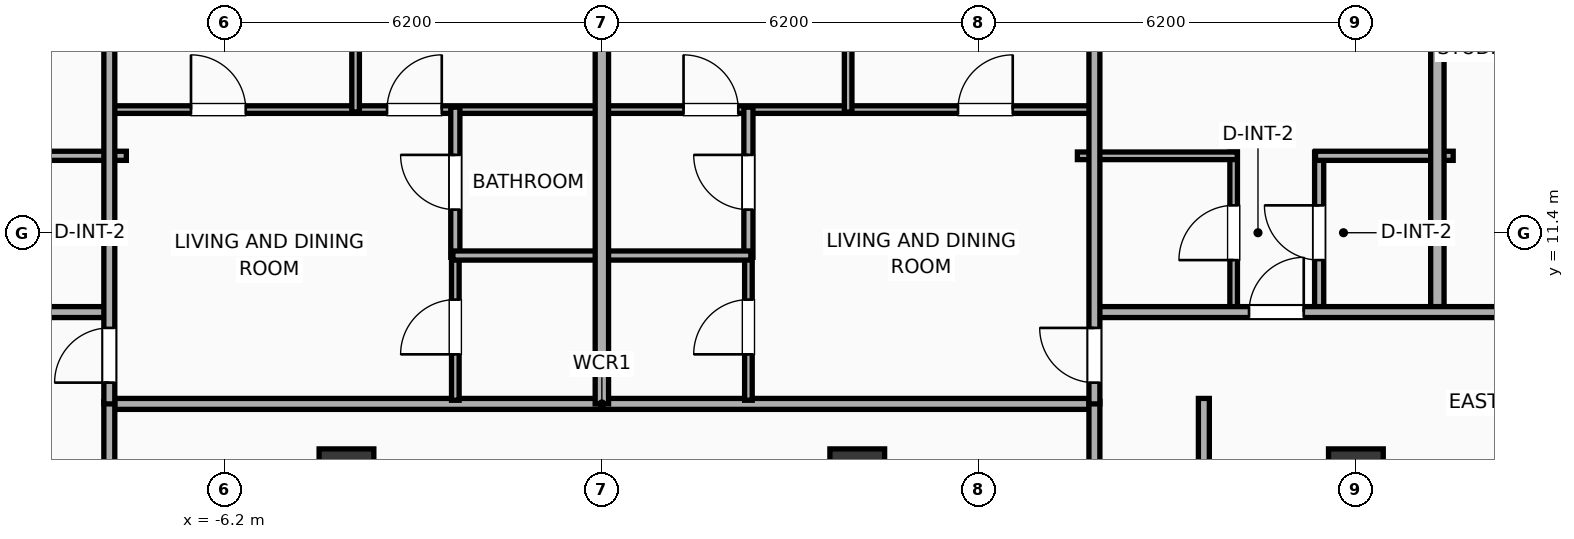
"""IFC4 building model, lengths in metres.
Left out: names, types, materials, properties, quantities, classifications, styles, units other than length and angle.
Written with IfcOpenShell. Run it as: python <this file> out.ifc"""

import sys

from ifc_helpers import new_model, si_unit, direction, frame, frame_2d, origin, origin_2d, place, context, subcontext, project, spatial, rectangle, extrude, element, fill, save


model = new_model("IFC4")
c1 = context("Model", 3, precision=1e-05, world=origin(), true_north=direction((0.0, 1.0)))
c2 = subcontext(c1, "Body", "Model", "MODEL_VIEW")
j1 = project(units=[si_unit("LENGTHUNIT", "METRE"), si_unit("PLANEANGLEUNIT", "RADIAN")], contexts=[c1])
p1 = place(None, origin())
s1 = spatial("IfcSite", under=j1, at=p1, CompositionType="ELEMENT")
p2 = place(p1, origin())
s2 = spatial("IfcBuilding", under=s1, at=p2, CompositionType="ELEMENT")
p3 = place(p2, frame((0.0, 0.0, 179.4)))
s3 = spatial("IfcBuildingStorey", under=s2, at=p3, CompositionType="ELEMENT", Elevation=179.4)
for number, where, z_axis, x_axis in (
    (1, (12.4, 7.4, 0.0), (0.0, 0.0, 1.0), (1.0, 0.0, 0.0)),
    (2, (-4.2, 7.4, 0.0), (0.0, 0.0, 1.0), (1.0, 0.0, 0.0)),
    (3, (4.2, 7.4, 0.0), (0.0, 0.0, 1.0), (1.0, 0.0, 0.0)),
):
    element("IfcColumn", number, at=place(p3, frame(where, z_axis=z_axis, x_axis=x_axis)), inside=s3, PredefinedType="COLUMN", context=c2, shape_type="SweptSolid", body=[
        extrude(rectangle(XDim=0.9, YDim=0.9, at=origin_2d()), origin(), (0.0, 0.0, 1.0), 3.9),
    ])
p4 = place(p3, frame((9.9, -8.68, 0.0), z_axis=(0.0, 0.0, 1.0), x_axis=(0.0, 1.0, 0.0)))
e4 = element("IfcWall", 4, at=p4, inside=s3, PredefinedType="PARTITIONING", context=c2, shape_type="SweptSolid", body=[
    extrude(rectangle(XDim=17.36, YDim=0.18, at=frame_2d((8.68, 0.0))), origin(), (0.0, 0.0, 1.0), 3.65),
])
p5 = place(p4, frame((7.262, 0.0, 0.0)))
e5 = element("IfcOpeningElement", 5, at=p5, cuts=e4, PredefinedType="OPENING", context=c2, shape_type="SweptSolid", body=[
    extrude(rectangle(XDim=1.1, YDim=2.05, at=frame_2d((0.55, 1.025))), frame((0.0, 0.1, 0.0), z_axis=(0.0, -1.0, 0.0), x_axis=(1.0, 0.0, 0.0)), (0.0, 0.0, 1.0), 0.2),
])
p6 = place(p3, frame((-8.15, 8.59, 0.0), z_axis=(0.0, 0.0, 1.0), x_axis=(1.0, 0.0, 0.0)))
e6 = element("IfcWall", 6, at=p6, inside=s3, PredefinedType="PARTITIONING", context=c2, shape_type="SweptSolid", body=[
    extrude(rectangle(XDim=16.3, YDim=0.18, at=frame_2d((8.15, 0.0))), origin(), (0.0, 0.0, 1.0), 3.65),
])
for number, where, z_axis, x_axis in (
    (7, (-8.1, 0.92, 0.0), (0.0, 0.0, 1.0), (0.0, 1.0, 0.0)),
    (8, (8.1, 0.92, 0.0), (0.0, 0.0, 1.0), (0.0, 1.0, 0.0)),
):
    element("IfcWall", number, at=place(p3, frame(where, z_axis=z_axis, x_axis=x_axis)), inside=s3, PredefinedType="PARTITIONING", context=c2, shape_type="SweptSolid", body=[
        extrude(rectangle(XDim=7.71, YDim=0.18, at=frame_2d((3.855, 0.0))), origin(), (0.0, 0.0, 1.0), 3.65),
    ])
p7 = place(p3, frame((-10.084, 12.67, 0.0), z_axis=(0.0, 0.0, 1.0), x_axis=(1.0, 0.0, 0.0)))
e9 = element("IfcWall", 9, at=p7, inside=s3, PredefinedType="PLUMBINGWALL", context=c2, shape_type="SweptSolid", body=[
    extrude(rectangle(XDim=2.264, YDim=0.15, at=frame_2d((1.132, 0.0))), origin(), (0.0, 0.0, 1.0), 3.65),
])
p8 = place(p3, frame((10.39, 10.08, 0.0), z_axis=(0.0, 0.0, 1.0), x_axis=(0.0, 1.0, 0.0)))
e10 = element("IfcWall", 10, at=p8, inside=s3, PredefinedType="PARTITIONING", context=c2, shape_type="SweptSolid", body=[
    extrude(rectangle(XDim=2.65, YDim=0.125, at=frame_2d((1.325, 0.0))), origin(), (0.0, 0.0, 1.0), 3.65),
])
p9 = place(p8, frame((0.875, 0.0, 0.0)))
e11 = element("IfcOpeningElement", 11, at=p9, cuts=e10, PredefinedType="OPENING", context=c2, shape_type="SweptSolid", body=[
    extrude(rectangle(XDim=0.9, YDim=2.05, at=frame_2d((0.45, 1.025))), frame((0.0, 0.073, 0.0), z_axis=(0.0, -1.0, 0.0), x_axis=(1.0, 0.0, 0.0)), (0.0, 0.0, 1.0), 0.145),
])
p10 = place(p3, frame((11.796, 10.08, 0.0), z_axis=(0.0, 0.0, 1.0), x_axis=(0.0, 1.0, 0.0)))
e12 = element("IfcWall", 12, at=p10, inside=s3, PredefinedType="PLUMBINGWALL", context=c2, shape_type="SweptSolid", body=[
    extrude(rectangle(XDim=2.65, YDim=0.15, at=frame_2d((1.325, 0.0))), origin(), (0.0, 0.0, 1.0), 3.04),
])
p11 = place(p10, frame((0.875, 0.0, 0.0)))
e13 = element("IfcOpeningElement", 13, at=p11, cuts=e12, PredefinedType="OPENING", context=c2, shape_type="SweptSolid", body=[
    extrude(rectangle(XDim=0.9, YDim=2.05, at=frame_2d((0.45, 1.025))), frame((0.0, 0.085, 0.0), z_axis=(0.0, -1.0, 0.0), x_axis=(1.0, 0.0, 0.0)), (0.0, 0.0, 1.0), 0.17),
])
p12 = place(p3, frame((7.82, 12.67, 0.0), z_axis=(0.0, 0.0, 1.0), x_axis=(1.0, 0.0, 0.0)))
e14 = element("IfcWall", 14, at=p12, inside=s3, PredefinedType="PARTITIONING", context=c2, shape_type="SweptSolid", body=[
    extrude(rectangle(XDim=2.63, YDim=0.125, at=frame_2d((1.315, 0.0))), origin(), (0.0, 0.0, 1.0), 3.65),
])
p13 = place(p3, frame((11.736, 12.67, 0.0), z_axis=(0.0, 0.0, 1.0), x_axis=(1.0, 0.0, 0.0)))
e15 = element("IfcWall", 15, at=p13, inside=s3, PredefinedType="PLUMBINGWALL", context=c2, shape_type="SweptSolid", body=[
    extrude(rectangle(XDim=2.264, YDim=0.15, at=frame_2d((1.132, 0.0))), origin(), (0.0, 0.0, 1.0), 3.65),
])
p14 = place(p3, frame((13.74, 10.02, 0.0), z_axis=(0.0, 0.0, 1.0), x_axis=(0.0, 1.0, 0.0)))
e16 = element("IfcWall", 16, at=p14, inside=s3, PredefinedType="PARTITIONING", context=c2, shape_type="SweptSolid", body=[
    extrude(rectangle(XDim=11.502, YDim=0.22, at=frame_2d((5.751, 0.0))), origin(), (0.0, 0.0, 1.0), 3.65),
])
p15 = place(p3, frame((-19.5, 10.1, 0.0), z_axis=(0.0, 0.0, 1.0), x_axis=(1.0, 0.0, 0.0)))
e17 = element("IfcWall", 17, at=p15, inside=s3, PredefinedType="PARTITIONING", context=c2, shape_type="SweptSolid", body=[
    extrude(rectangle(XDim=11.42, YDim=0.18, at=frame_2d((5.71, 0.0))), origin(), (0.0, 0.0, 1.0), 3.65),
])
p16 = place(p15, frame((3.464, 0.0, 0.0)))
e18 = element("IfcOpeningElement", 18, at=p16, cuts=e17, PredefinedType="OPENING", context=c2, shape_type="SweptSolid", body=[
    extrude(rectangle(XDim=1.15, YDim=2.05, at=frame_2d((0.575, 1.025))), frame((0.0, 0.1, 0.0), z_axis=(0.0, -1.0, 0.0), x_axis=(1.0, 0.0, 0.0)), (0.0, 0.0, 1.0), 0.2),
])
p17 = place(p15, frame((8.323, 0.0, 0.0)))
e19 = element("IfcOpeningElement", 19, at=p17, cuts=e17, PredefinedType="OPENING", context=c2, shape_type="SweptSolid", body=[
    extrude(rectangle(XDim=0.9, YDim=2.05, at=frame_2d((0.45, 1.025))), frame((0.0, 0.1, 0.0), z_axis=(0.0, -1.0, 0.0), x_axis=(1.0, 0.0, 0.0)), (0.0, 0.0, 1.0), 0.2),
])
p18 = place(p3, frame((8.08, 10.1, 0.0), z_axis=(0.0, 0.0, 1.0), x_axis=(1.0, 0.0, 0.0)))
e20 = element("IfcWall", 20, at=p18, inside=s3, PredefinedType="PARTITIONING", context=c2, shape_type="SweptSolid", body=[
    extrude(rectangle(XDim=11.42, YDim=0.18, at=frame_2d((5.71, 0.0))), origin(), (0.0, 0.0, 1.0), 3.65),
])
p19 = place(p18, frame((2.562, 0.0, 0.0)))
e21 = element("IfcOpeningElement", 21, at=p19, cuts=e20, PredefinedType="OPENING", context=c2, shape_type="SweptSolid", body=[
    extrude(rectangle(XDim=0.9, YDim=2.05, at=frame_2d((0.45, 1.025))), frame((0.0, 0.1, 0.0), z_axis=(0.0, -1.0, 0.0), x_axis=(1.0, 0.0, 0.0)), (0.0, 0.0, 1.0), 0.2),
])
p20 = place(p18, frame((6.853, 0.0, 0.0)))
e22 = element("IfcOpeningElement", 22, at=p20, cuts=e20, PredefinedType="OPENING", context=c2, shape_type="SweptSolid", body=[
    extrude(rectangle(XDim=1.15, YDim=2.05, at=frame_2d((0.575, 1.025))), frame((0.0, 0.1, 0.0), z_axis=(0.0, -1.0, 0.0), x_axis=(1.0, 0.0, 0.0)), (0.0, 0.0, 1.0), 0.2),
])
p21 = place(p3, frame((-8.08, 13.43, 0.0), z_axis=(0.0, 0.0, 1.0), x_axis=(1.0, 0.0, 0.0)))
e23 = element("IfcWall", 23, at=p21, inside=s3, PredefinedType="PARTITIONING", context=c2, shape_type="SweptSolid", body=[
    extrude(rectangle(XDim=8.06, YDim=0.125, at=frame_2d((4.03, 0.0))), origin(), (0.0, 0.0, 1.0), 3.65),
])
p22 = place(p21, frame((1.323, 0.0, 0.0)))
e24 = element("IfcOpeningElement", 24, at=p22, cuts=e23, PredefinedType="OPENING", context=c2, shape_type="SweptSolid", body=[
    extrude(rectangle(XDim=0.9, YDim=2.05, at=frame_2d((0.45, 1.025))), frame((0.0, 0.073, 0.0), z_axis=(0.0, -1.0, 0.0), x_axis=(1.0, 0.0, 0.0)), (0.0, 0.0, 1.0), 0.145),
])
p23 = place(p21, frame((4.547, 0.0, 0.0)))
e25 = element("IfcOpeningElement", 25, at=p23, cuts=e23, PredefinedType="OPENING", context=c2, shape_type="SweptSolid", body=[
    extrude(rectangle(XDim=0.9, YDim=2.05, at=frame_2d((0.45, 1.025))), frame((0.0, 0.073, 0.0), z_axis=(0.0, -1.0, 0.0), x_axis=(1.0, 0.0, 0.0)), (0.0, 0.0, 1.0), 0.145),
])
p24 = place(p3, frame((-2.41, 8.65, 0.0), z_axis=(0.0, 0.0, 1.0), x_axis=(0.0, 1.0, 0.0)))
e26 = element("IfcWall", 26, at=p24, inside=s3, PredefinedType="PARTITIONING", context=c2, shape_type="SweptSolid", body=[
    extrude(rectangle(XDim=2.41, YDim=0.125, at=frame_2d((1.205, 0.0))), origin(), (0.0, 0.0, 1.0), 3.65),
])
p25 = place(p24, frame((0.755, 0.0, 0.0)))
e27 = element("IfcOpeningElement", 27, at=p25, cuts=e26, PredefinedType="OPENING", context=c2, shape_type="SweptSolid", body=[
    extrude(rectangle(XDim=0.9, YDim=2.05, at=frame_2d((0.45, 1.025))), frame((0.0, 0.073, 0.0), z_axis=(0.0, -1.0, 0.0), x_axis=(1.0, 0.0, 0.0)), (0.0, 0.0, 1.0), 0.145),
])
p26 = place(p3, frame((-2.41, 11.0, 0.0), z_axis=(0.0, 0.0, 1.0), x_axis=(0.0, 1.0, 0.0)))
e28 = element("IfcWall", 28, at=p26, inside=s3, PredefinedType="PLUMBINGWALL", context=c2, shape_type="SweptSolid", body=[
    extrude(rectangle(XDim=2.47, YDim=0.15, at=frame_2d((1.235, 0.0))), origin(), (0.0, 0.0, 1.0), 3.04),
])
p27 = place(p26, frame((0.785, 0.0, 0.0)))
e29 = element("IfcOpeningElement", 29, at=p27, cuts=e28, PredefinedType="OPENING", context=c2, shape_type="SweptSolid", body=[
    extrude(rectangle(XDim=0.9, YDim=2.05, at=frame_2d((0.45, 1.025))), frame((0.0, 0.085, 0.0), z_axis=(0.0, -1.0, 0.0), x_axis=(1.0, 0.0, 0.0)), (0.0, 0.0, 1.0), 0.17),
])
p28 = place(p3, frame((-2.45, 11.03, 0.0), z_axis=(0.0, 0.0, 1.0), x_axis=(1.0, 0.0, 0.0)))
e30 = element("IfcWall", 30, at=p28, inside=s3, PredefinedType="PLUMBINGWALL", context=c2, shape_type="SweptSolid", body=[
    extrude(rectangle(XDim=2.43, YDim=0.15, at=frame_2d((1.215, 0.0))), origin(), (0.0, 0.0, 1.0), 3.65),
])
p29 = place(p3, frame((-4.05, 13.39, 0.0), z_axis=(0.0, 0.0, 1.0), x_axis=(0.0, 1.0, 0.0)))
e31 = element("IfcWall", 31, at=p29, inside=s3, PredefinedType="PARTITIONING", context=c2, shape_type="SweptSolid", body=[
    extrude(rectangle(XDim=6.262, YDim=0.125, at=frame_2d((3.131, 0.0))), origin(), (0.0, 0.0, 1.0), 3.65),
])
p30 = place(p3, frame((-8.1, 8.59, 0.0), z_axis=(0.0, 0.0, 1.0), x_axis=(0.0, 1.0, 0.0)))
e32 = element("IfcWall", 32, at=p30, inside=s3, PredefinedType="PARTITIONING", context=c2, shape_type="SweptSolid", body=[
    extrude(rectangle(XDim=10.636, YDim=0.18, at=frame_2d((5.318, 0.0))), origin(), (0.0, 0.0, 1.0), 3.65),
])
p31 = place(p30, frame((0.35, 0.0, 0.0)))
e33 = element("IfcOpeningElement", 33, at=p31, cuts=e32, PredefinedType="OPENING", context=c2, shape_type="SweptSolid", body=[
    extrude(rectangle(XDim=0.9, YDim=2.05, at=frame_2d((0.45, 1.025))), frame((0.0, 0.1, 0.0), z_axis=(0.0, -1.0, 0.0), x_axis=(1.0, 0.0, 0.0)), (0.0, 0.0, 1.0), 0.2),
])
p32 = place(p3, frame((0.02, 13.43, 0.0), z_axis=(0.0, 0.0, 1.0), x_axis=(1.0, 0.0, 0.0)))
e34 = element("IfcWall", 34, at=p32, inside=s3, PredefinedType="PARTITIONING", context=c2, shape_type="SweptSolid", body=[
    extrude(rectangle(XDim=8.06, YDim=0.125, at=frame_2d((4.03, 0.0))), origin(), (0.0, 0.0, 1.0), 3.65),
])
p33 = place(p32, frame((1.323, 0.0, 0.0)))
e35 = element("IfcOpeningElement", 35, at=p33, cuts=e34, PredefinedType="OPENING", context=c2, shape_type="SweptSolid", body=[
    extrude(rectangle(XDim=0.9, YDim=2.05, at=frame_2d((0.45, 1.025))), frame((0.0, 0.073, 0.0), z_axis=(0.0, -1.0, 0.0), x_axis=(1.0, 0.0, 0.0)), (0.0, 0.0, 1.0), 0.145),
])
p34 = place(p32, frame((5.837, 0.0, 0.0)))
e36 = element("IfcOpeningElement", 36, at=p34, cuts=e34, PredefinedType="OPENING", context=c2, shape_type="SweptSolid", body=[
    extrude(rectangle(XDim=0.9, YDim=2.05, at=frame_2d((0.45, 1.025))), frame((0.0, 0.073, 0.0), z_axis=(0.0, -1.0, 0.0), x_axis=(1.0, 0.0, 0.0)), (0.0, 0.0, 1.0), 0.145),
])
p35 = place(p3, frame((2.41, 8.65, 0.0), z_axis=(0.0, 0.0, 1.0), x_axis=(0.0, 1.0, 0.0)))
e37 = element("IfcWall", 37, at=p35, inside=s3, PredefinedType="PARTITIONING", context=c2, shape_type="SweptSolid", body=[
    extrude(rectangle(XDim=2.41, YDim=0.125, at=frame_2d((1.205, 0.0))), origin(), (0.0, 0.0, 1.0), 3.65),
])
p36 = place(p35, frame((0.755, 0.0, 0.0)))
e38 = element("IfcOpeningElement", 38, at=p36, cuts=e37, PredefinedType="OPENING", context=c2, shape_type="SweptSolid", body=[
    extrude(rectangle(XDim=0.9, YDim=2.05, at=frame_2d((0.45, 1.025))), frame((0.0, 0.073, 0.0), z_axis=(0.0, -1.0, 0.0), x_axis=(1.0, 0.0, 0.0)), (0.0, 0.0, 1.0), 0.145),
])
p37 = place(p3, frame((2.41, 11.0, 0.0), z_axis=(0.0, 0.0, 1.0), x_axis=(0.0, 1.0, 0.0)))
e39 = element("IfcWall", 39, at=p37, inside=s3, PredefinedType="PLUMBINGWALL", context=c2, shape_type="SweptSolid", body=[
    extrude(rectangle(XDim=2.47, YDim=0.15, at=frame_2d((1.235, 0.0))), origin(), (0.0, 0.0, 1.0), 3.65),
])
p38 = place(p37, frame((0.785, 0.0, 0.0)))
e40 = element("IfcOpeningElement", 40, at=p38, cuts=e39, PredefinedType="OPENING", context=c2, shape_type="SweptSolid", body=[
    extrude(rectangle(XDim=0.9, YDim=2.05, at=frame_2d((0.45, 1.025))), frame((0.0, 0.085, 0.0), z_axis=(0.0, -1.0, 0.0), x_axis=(1.0, 0.0, 0.0)), (0.0, 0.0, 1.0), 0.17),
])
p39 = place(p3, frame((0.02, 11.03, 0.0), z_axis=(0.0, 0.0, 1.0), x_axis=(1.0, 0.0, 0.0)))
e41 = element("IfcWall", 41, at=p39, inside=s3, PredefinedType="PLUMBINGWALL", context=c2, shape_type="SweptSolid", body=[
    extrude(rectangle(XDim=2.43, YDim=0.15, at=frame_2d((1.215, 0.0))), origin(), (0.0, 0.0, 1.0), 3.65),
])
p40 = place(p3, frame((4.05, 13.39, 0.0), z_axis=(0.0, 0.0, 1.0), x_axis=(0.0, 1.0, 0.0)))
e42 = element("IfcWall", 42, at=p40, inside=s3, PredefinedType="PARTITIONING", context=c2, shape_type="SweptSolid", body=[
    extrude(rectangle(XDim=7.114, YDim=0.125, at=frame_2d((3.557, 0.0))), origin(), (0.0, 0.0, 1.0), 3.65),
])
p41 = place(p3, frame((8.1, 8.59, 0.0), z_axis=(0.0, 0.0, 1.0), x_axis=(0.0, 1.0, 0.0)))
e43 = element("IfcWall", 43, at=p41, inside=s3, PredefinedType="PARTITIONING", context=c2, shape_type="SweptSolid", body=[
    extrude(rectangle(XDim=12.339, YDim=0.18, at=frame_2d((6.169, 0.0))), origin(), (0.0, 0.0, 1.0), 3.65),
])
p42 = place(p41, frame((0.35, 0.0, 0.0)))
e44 = element("IfcOpeningElement", 44, at=p42, cuts=e43, PredefinedType="OPENING", context=c2, shape_type="SweptSolid", body=[
    extrude(rectangle(XDim=0.9, YDim=2.05, at=frame_2d((0.45, 1.025))), frame((0.0, 0.1, 0.0), z_axis=(0.0, -1.0, 0.0), x_axis=(1.0, 0.0, 0.0)), (0.0, 0.0, 1.0), 0.2),
])
p43 = place(p3, frame((0.0, 8.59, 0.0), z_axis=(0.0, 0.0, 1.0), x_axis=(0.0, 1.0, 0.0)))
e45 = element("IfcWall", 45, at=p43, inside=s3, PredefinedType="PARTITIONING", context=c2, shape_type="SweptSolid", body=[
    extrude(rectangle(XDim=11.488, YDim=0.22, at=frame_2d((5.744, 0.0))), origin(), (0.0, 0.0, 1.0), 3.04),
])
p44 = place(p9, origin())
e46 = element("IfcDoor", 46, at=p44, inside=s3, OperationType="SINGLE_SWING_LEFT", PredefinedType="DOOR", context=c2, shape_type="SweptSolid", body=[
    extrude(rectangle(XDim=0.9, YDim=2.05, at=frame_2d((0.45, 1.025))), frame((0.0, 0.025, 0.0), z_axis=(0.0, -1.0, 0.0), x_axis=(1.0, 0.0, 0.0)), (0.0, 0.0, 1.0), 0.05),
])
fill(e11, e46)
p45 = place(p11, origin())
e47 = element("IfcDoor", 47, at=p45, inside=s3, OperationType="SINGLE_SWING_RIGHT", PredefinedType="DOOR", context=c2, shape_type="SweptSolid", body=[
    extrude(rectangle(XDim=0.9, YDim=2.05, at=frame_2d((0.45, 1.025))), frame((0.0, 0.025, 0.0), z_axis=(0.0, -1.0, 0.0), x_axis=(1.0, 0.0, 0.0)), (0.0, 0.0, 1.0), 0.05),
])
fill(e13, e47)
p46 = place(p19, origin())
e48 = element("IfcDoor", 48, at=p46, inside=s3, OperationType="SINGLE_SWING_RIGHT", PredefinedType="DOOR", context=c2, shape_type="SweptSolid", body=[
    extrude(rectangle(XDim=0.9, YDim=2.05, at=frame_2d((0.45, 1.025))), frame((0.0, 0.025, 0.0), z_axis=(0.0, -1.0, 0.0), x_axis=(1.0, 0.0, 0.0)), (0.0, 0.0, 1.0), 0.05),
])
fill(e21, e48)
p47 = place(p22, origin())
e49 = element("IfcDoor", 49, at=p47, inside=s3, OperationType="SINGLE_SWING_LEFT", PredefinedType="DOOR", context=c2, shape_type="SweptSolid", body=[
    extrude(rectangle(XDim=0.9, YDim=2.05, at=frame_2d((0.45, 1.025))), frame((0.0, 0.025, 0.0), z_axis=(0.0, -1.0, 0.0), x_axis=(1.0, 0.0, 0.0)), (0.0, 0.0, 1.0), 0.05),
])
fill(e24, e49)
p48 = place(p23, origin())
e50 = element("IfcDoor", 50, at=p48, inside=s3, OperationType="SINGLE_SWING_RIGHT", PredefinedType="DOOR", context=c2, shape_type="SweptSolid", body=[
    extrude(rectangle(XDim=0.9, YDim=2.05, at=frame_2d((0.45, 1.025))), frame((0.0, 0.025, 0.0), z_axis=(0.0, -1.0, 0.0), x_axis=(1.0, 0.0, 0.0)), (0.0, 0.0, 1.0), 0.05),
])
fill(e25, e50)
p49 = place(p25, origin())
e51 = element("IfcDoor", 51, at=p49, inside=s3, OperationType="SINGLE_SWING_LEFT", PredefinedType="DOOR", context=c2, shape_type="SweptSolid", body=[
    extrude(rectangle(XDim=0.9, YDim=2.05, at=frame_2d((0.45, 1.025))), frame((0.0, 0.025, 0.0), z_axis=(0.0, -1.0, 0.0), x_axis=(1.0, 0.0, 0.0)), (0.0, 0.0, 1.0), 0.05),
])
fill(e27, e51)
p50 = place(p27, origin())
e52 = element("IfcDoor", 52, at=p50, inside=s3, OperationType="SINGLE_SWING_RIGHT", PredefinedType="DOOR", context=c2, shape_type="SweptSolid", body=[
    extrude(rectangle(XDim=0.9, YDim=2.05, at=frame_2d((0.45, 1.025))), frame((0.0, 0.025, 0.0), z_axis=(0.0, -1.0, 0.0), x_axis=(1.0, 0.0, 0.0)), (0.0, 0.0, 1.0), 0.05),
])
fill(e29, e52)
p51 = place(p31, origin())
e53 = element("IfcDoor", 53, at=p51, inside=s3, OperationType="SINGLE_SWING_LEFT", PredefinedType="DOOR", context=c2, shape_type="SweptSolid", body=[
    extrude(rectangle(XDim=0.9, YDim=2.05, at=frame_2d((0.45, 1.025))), frame((0.0, 0.025, 0.0), z_axis=(0.0, -1.0, 0.0), x_axis=(1.0, 0.0, 0.0)), (0.0, 0.0, 1.0), 0.05),
])
fill(e33, e53)
p52 = place(p33, origin())
e54 = element("IfcDoor", 54, at=p52, inside=s3, OperationType="SINGLE_SWING_LEFT", PredefinedType="DOOR", context=c2, shape_type="SweptSolid", body=[
    extrude(rectangle(XDim=0.9, YDim=2.05, at=frame_2d((0.45, 1.025))), frame((0.0, 0.025, 0.0), z_axis=(0.0, -1.0, 0.0), x_axis=(1.0, 0.0, 0.0)), (0.0, 0.0, 1.0), 0.05),
])
fill(e35, e54)
p53 = place(p34, origin())
e55 = element("IfcDoor", 55, at=p53, inside=s3, OperationType="SINGLE_SWING_RIGHT", PredefinedType="DOOR", context=c2, shape_type="SweptSolid", body=[
    extrude(rectangle(XDim=0.9, YDim=2.05, at=frame_2d((0.45, 1.025))), frame((0.0, 0.025, 0.0), z_axis=(0.0, -1.0, 0.0), x_axis=(1.0, 0.0, 0.0)), (0.0, 0.0, 1.0), 0.05),
])
fill(e36, e55)
p54 = place(p36, origin())
e56 = element("IfcDoor", 56, at=p54, inside=s3, OperationType="SINGLE_SWING_LEFT", PredefinedType="DOOR", context=c2, shape_type="SweptSolid", body=[
    extrude(rectangle(XDim=0.9, YDim=2.05, at=frame_2d((0.45, 1.025))), frame((0.0, 0.025, 0.0), z_axis=(0.0, -1.0, 0.0), x_axis=(1.0, 0.0, 0.0)), (0.0, 0.0, 1.0), 0.05),
])
fill(e38, e56)
p55 = place(p38, origin())
e57 = element("IfcDoor", 57, at=p55, inside=s3, OperationType="SINGLE_SWING_RIGHT", PredefinedType="DOOR", context=c2, shape_type="SweptSolid", body=[
    extrude(rectangle(XDim=0.9, YDim=2.05, at=frame_2d((0.45, 1.025))), frame((0.0, 0.025, 0.0), z_axis=(0.0, -1.0, 0.0), x_axis=(1.0, 0.0, 0.0)), (0.0, 0.0, 1.0), 0.05),
])
fill(e40, e57)
p56 = place(p42, origin())
e58 = element("IfcDoor", 58, at=p56, inside=s3, OperationType="SINGLE_SWING_RIGHT", PredefinedType="DOOR", context=c2, shape_type="SweptSolid", body=[
    extrude(rectangle(XDim=0.9, YDim=2.05, at=frame_2d((0.45, 1.025))), frame((0.0, 0.025, 0.0), z_axis=(0.0, -1.0, 0.0), x_axis=(1.0, 0.0, 0.0)), (0.0, 0.0, 1.0), 0.05),
])
fill(e44, e58)
save(model, sys.argv[1])
